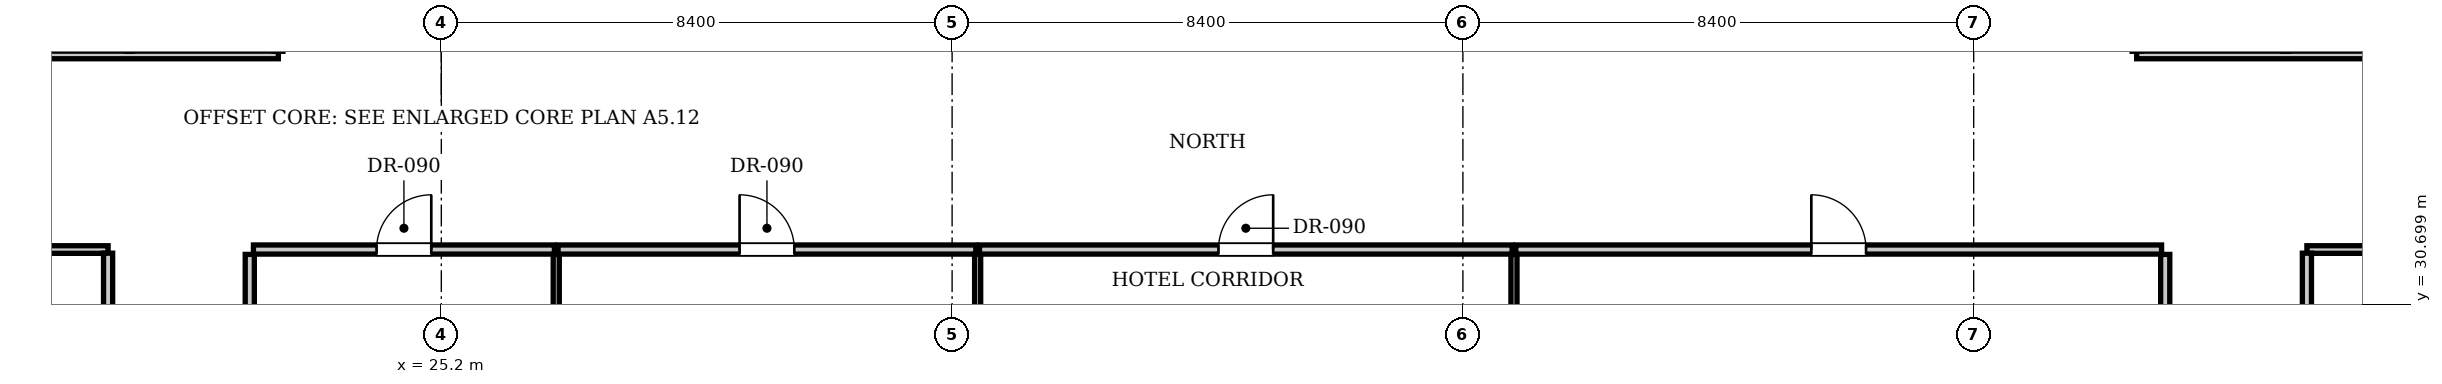
"""IFC4 building model, lengths in metres.
Left out: names, types, materials, properties, quantities, classifications, styles, units other than length and angle.
Written with IfcOpenShell. Run it as: python <this file> out.ifc"""

import sys

from ifc_helpers import new_model, si_unit, direction, frame, frame_2d, origin, place, context, subcontext, project, spatial, rectangle, extrude, element, fill, save


model = new_model("IFC4")
c1 = context("Model", 3, precision=1e-05, world=origin(), true_north=direction((0.0, 1.0)))
c2 = subcontext(c1, "Body", "Model", "MODEL_VIEW")
j1 = project(units=[si_unit("LENGTHUNIT", "METRE"), si_unit("PLANEANGLEUNIT", "RADIAN")], contexts=[c1])
p1 = place(None, origin())
s1 = spatial("IfcSite", under=j1, at=p1, CompositionType="ELEMENT")
p2 = place(p1, origin())
s2 = spatial("IfcBuilding", under=s1, at=p2, CompositionType="ELEMENT")
p3 = place(p2, frame((0.0, 0.0, 77.0)))
s3 = spatial("IfcBuildingStorey", under=s2, at=p3, CompositionType="ELEMENT", Elevation=77.0)
for number, where, z_axis, x_axis in (
    (1, (22.05, 23.68, 0.0), (0.0, 0.0, 1.0), (0.0, 1.0, 0.0)),
    (2, (53.55, 23.68, 0.0), (0.0, 0.0, 1.0), (0.0, 1.0, 0.0)),
):
    element("IfcWall", number, at=place(p3, frame(where, z_axis=z_axis, x_axis=x_axis)), inside=s3, PredefinedType="PARTITIONING", context=c2, shape_type="SweptSolid", body=[
        extrude(rectangle(XDim=7.84, YDim=0.15, at=frame_2d((3.92, 0.0))), origin(), (0.0, 0.0, 1.0), 3.61),
    ])
p4 = place(p3, frame((22.11, 31.6, 0.0), z_axis=(0.0, 0.0, 1.0), x_axis=(1.0, 0.0, 0.0)))
e3 = element("IfcWall", 3, at=p4, inside=s3, PredefinedType="PARTITIONING", context=c2, shape_type="SweptSolid", body=[
    extrude(rectangle(XDim=4.95, YDim=0.15, at=frame_2d((2.475, 0.0))), origin(), (0.0, 0.0, 1.0), 3.61),
])
p5 = place(p4, frame((2.025, 0.0, 0.0)))
e4 = element("IfcOpeningElement", 4, at=p5, cuts=e3, PredefinedType="OPENING", context=c2, shape_type="SweptSolid", body=[
    extrude(rectangle(XDim=0.9, YDim=2.1, at=frame_2d((0.45, 1.05))), frame((0.0, 0.085, 0.0), z_axis=(0.0, -1.0, 0.0), x_axis=(1.0, 0.0, 0.0)), (0.0, 0.0, 1.0), 0.17),
])
p6 = place(p3, frame((27.09, 23.68, 0.0), z_axis=(0.0, 0.0, 1.0), x_axis=(0.0, 1.0, 0.0)))
e5 = element("IfcWall", 5, at=p6, inside=s3, PredefinedType="PARTITIONING", context=c2, shape_type="SweptSolid", body=[
    extrude(rectangle(XDim=7.84, YDim=0.1, at=frame_2d((3.92, 0.0))), origin(), (0.0, 0.0, 1.0), 3.61),
])
p7 = place(p3, frame((27.12, 31.6, 0.0), z_axis=(0.0, 0.0, 1.0), x_axis=(1.0, 0.0, 0.0)))
e6 = element("IfcWall", 6, at=p7, inside=s3, PredefinedType="PARTITIONING", context=c2, shape_type="SweptSolid", body=[
    extrude(rectangle(XDim=6.87, YDim=0.15, at=frame_2d((3.435, 0.0))), origin(), (0.0, 0.0, 1.0), 3.61),
])
p8 = place(p7, frame((2.985, 0.0, 0.0)))
e7 = element("IfcOpeningElement", 7, at=p8, cuts=e6, PredefinedType="OPENING", context=c2, shape_type="SweptSolid", body=[
    extrude(rectangle(XDim=0.9, YDim=2.1, at=frame_2d((0.45, 1.05))), frame((0.0, 0.085, 0.0), z_axis=(0.0, -1.0, 0.0), x_axis=(1.0, 0.0, 0.0)), (0.0, 0.0, 1.0), 0.17),
])
p9 = place(p3, frame((34.02, 23.68, 0.0), z_axis=(0.0, 0.0, 1.0), x_axis=(0.0, 1.0, 0.0)))
e8 = element("IfcWall", 8, at=p9, inside=s3, PredefinedType="PARTITIONING", context=c2, shape_type="SweptSolid", body=[
    extrude(rectangle(XDim=7.84, YDim=0.1, at=frame_2d((3.92, 0.0))), origin(), (0.0, 0.0, 1.0), 3.61),
])
p10 = place(p3, frame((34.05, 31.6, 0.0), z_axis=(0.0, 0.0, 1.0), x_axis=(1.0, 0.0, 0.0)))
e9 = element("IfcWall", 9, at=p10, inside=s3, PredefinedType="PARTITIONING", context=c2, shape_type="SweptSolid", body=[
    extrude(rectangle(XDim=8.76, YDim=0.15, at=frame_2d((4.38, 0.0))), origin(), (0.0, 0.0, 1.0), 3.61),
])
p11 = place(p10, frame((3.93, 0.0, 0.0)))
e10 = element("IfcOpeningElement", 10, at=p11, cuts=e9, PredefinedType="OPENING", context=c2, shape_type="SweptSolid", body=[
    extrude(rectangle(XDim=0.9, YDim=2.1, at=frame_2d((0.45, 1.05))), frame((0.0, 0.085, 0.0), z_axis=(0.0, -1.0, 0.0), x_axis=(1.0, 0.0, 0.0)), (0.0, 0.0, 1.0), 0.17),
])
p12 = place(p3, frame((42.84, 23.68, 0.0), z_axis=(0.0, 0.0, 1.0), x_axis=(0.0, 1.0, 0.0)))
e11 = element("IfcWall", 11, at=p12, inside=s3, PredefinedType="PARTITIONING", context=c2, shape_type="SweptSolid", body=[
    extrude(rectangle(XDim=7.84, YDim=0.1, at=frame_2d((3.92, 0.0))), origin(), (0.0, 0.0, 1.0), 3.61),
])
p13 = place(p3, frame((42.87, 31.6, 0.0), z_axis=(0.0, 0.0, 1.0), x_axis=(1.0, 0.0, 0.0)))
e12 = element("IfcWall", 12, at=p13, inside=s3, PredefinedType="PARTITIONING", context=c2, shape_type="SweptSolid", body=[
    extrude(rectangle(XDim=10.62, YDim=0.15, at=frame_2d((5.31, 0.0))), origin(), (0.0, 0.0, 1.0), 3.61),
])
p14 = place(p13, frame((4.86, 0.0, 0.0)))
e13 = element("IfcOpeningElement", 13, at=p14, cuts=e12, PredefinedType="OPENING", context=c2, shape_type="SweptSolid", body=[
    extrude(rectangle(XDim=0.9, YDim=2.1, at=frame_2d((0.45, 1.05))), frame((0.0, 0.085, 0.0), z_axis=(0.0, -1.0, 0.0), x_axis=(1.0, 0.0, 0.0)), (0.0, 0.0, 1.0), 0.17),
])
for number, where, z_axis, x_axis in (
    (14, (10.9, 31.6, 0.0), (0.0, 0.0, 1.0), (1.0, 0.0, 0.0)),
    (15, (55.88, 31.6, 0.0), (0.0, 0.0, 1.0), (1.0, 0.0, 0.0)),
):
    element("IfcWall", number, at=place(p3, frame(where, z_axis=z_axis, x_axis=x_axis)), inside=s3, PredefinedType="PARTITIONING", context=c2, shape_type="SweptSolid", body=[
        extrude(rectangle(XDim=8.82, YDim=0.125, at=frame_2d((4.41, 0.0))), origin(), (0.0, 0.0, 1.0), 3.61),
    ])
for number, where, z_axis, x_axis in (
    (16, (19.72, 29.65, 0.0), (0.0, 0.0, 1.0), (0.0, 1.0, 0.0)),
    (17, (55.88, 29.65, 0.0), (0.0, 0.0, 1.0), (0.0, 1.0, 0.0)),
):
    element("IfcWall", number, at=place(p3, frame(where, z_axis=z_axis, x_axis=x_axis)), inside=s3, PredefinedType="PARTITIONING", context=c2, shape_type="SweptSolid", body=[
        extrude(rectangle(XDim=1.89, YDim=0.15, at=frame_2d((0.945, 0.0))), origin(), (0.0, 0.0, 1.0), 3.61),
    ])
p15 = place(p3, frame((10.9, 34.8, 0.0), z_axis=(0.0, 0.0, 1.0), x_axis=(1.0, 0.0, 0.0)))
e18 = element("IfcWall", 18, at=p15, inside=s3, PredefinedType="PARTITIONING", context=c2, shape_type="SweptSolid", body=[
    extrude(rectangle(XDim=11.62, YDim=0.125, at=frame_2d((5.81, 0.0))), origin(), (0.0, 0.0, 1.0), 3.61),
])
p16 = place(p3, frame((53.08, 34.8, 0.0), z_axis=(0.0, 0.0, 1.0), x_axis=(1.0, 0.0, 0.0)))
e19 = element("IfcWall", 19, at=p16, inside=s3, PredefinedType="PARTITIONING", context=c2, shape_type="SweptSolid", body=[
    extrude(rectangle(XDim=11.62, YDim=0.125, at=frame_2d((5.81, 0.0))), origin(), (0.0, 0.0, 1.0), 3.61),
])
p17 = place(p5, origin())
e20 = element("IfcDoor", 20, at=p17, inside=s3, OperationType="SINGLE_SWING_RIGHT", PredefinedType="DOOR", context=c2, shape_type="SweptSolid", body=[
    extrude(rectangle(XDim=0.9, YDim=2.1, at=frame_2d((0.45, 1.05))), frame((0.0, 0.025, 0.0), z_axis=(0.0, -1.0, 0.0), x_axis=(1.0, 0.0, 0.0)), (0.0, 0.0, 1.0), 0.05),
])
fill(e4, e20)
p18 = place(p8, origin())
e21 = element("IfcDoor", 21, at=p18, inside=s3, OperationType="SINGLE_SWING_LEFT", PredefinedType="DOOR", context=c2, shape_type="SweptSolid", body=[
    extrude(rectangle(XDim=0.9, YDim=2.1, at=frame_2d((0.45, 1.05))), frame((0.0, 0.025, 0.0), z_axis=(0.0, -1.0, 0.0), x_axis=(1.0, 0.0, 0.0)), (0.0, 0.0, 1.0), 0.05),
])
fill(e7, e21)
p19 = place(p11, origin())
e22 = element("IfcDoor", 22, at=p19, inside=s3, OperationType="SINGLE_SWING_RIGHT", PredefinedType="DOOR", context=c2, shape_type="SweptSolid", body=[
    extrude(rectangle(XDim=0.9, YDim=2.1, at=frame_2d((0.45, 1.05))), frame((0.0, 0.025, 0.0), z_axis=(0.0, -1.0, 0.0), x_axis=(1.0, 0.0, 0.0)), (0.0, 0.0, 1.0), 0.05),
])
fill(e10, e22)
p20 = place(p14, origin())
e23 = element("IfcDoor", 23, at=p20, inside=s3, OperationType="SINGLE_SWING_LEFT", PredefinedType="DOOR", context=c2, shape_type="SweptSolid", body=[
    extrude(rectangle(XDim=0.9, YDim=2.1, at=frame_2d((0.45, 1.05))), frame((0.0, 0.025, 0.0), z_axis=(0.0, -1.0, 0.0), x_axis=(1.0, 0.0, 0.0)), (0.0, 0.0, 1.0), 0.05),
])
fill(e13, e23)
save(model, sys.argv[1])
